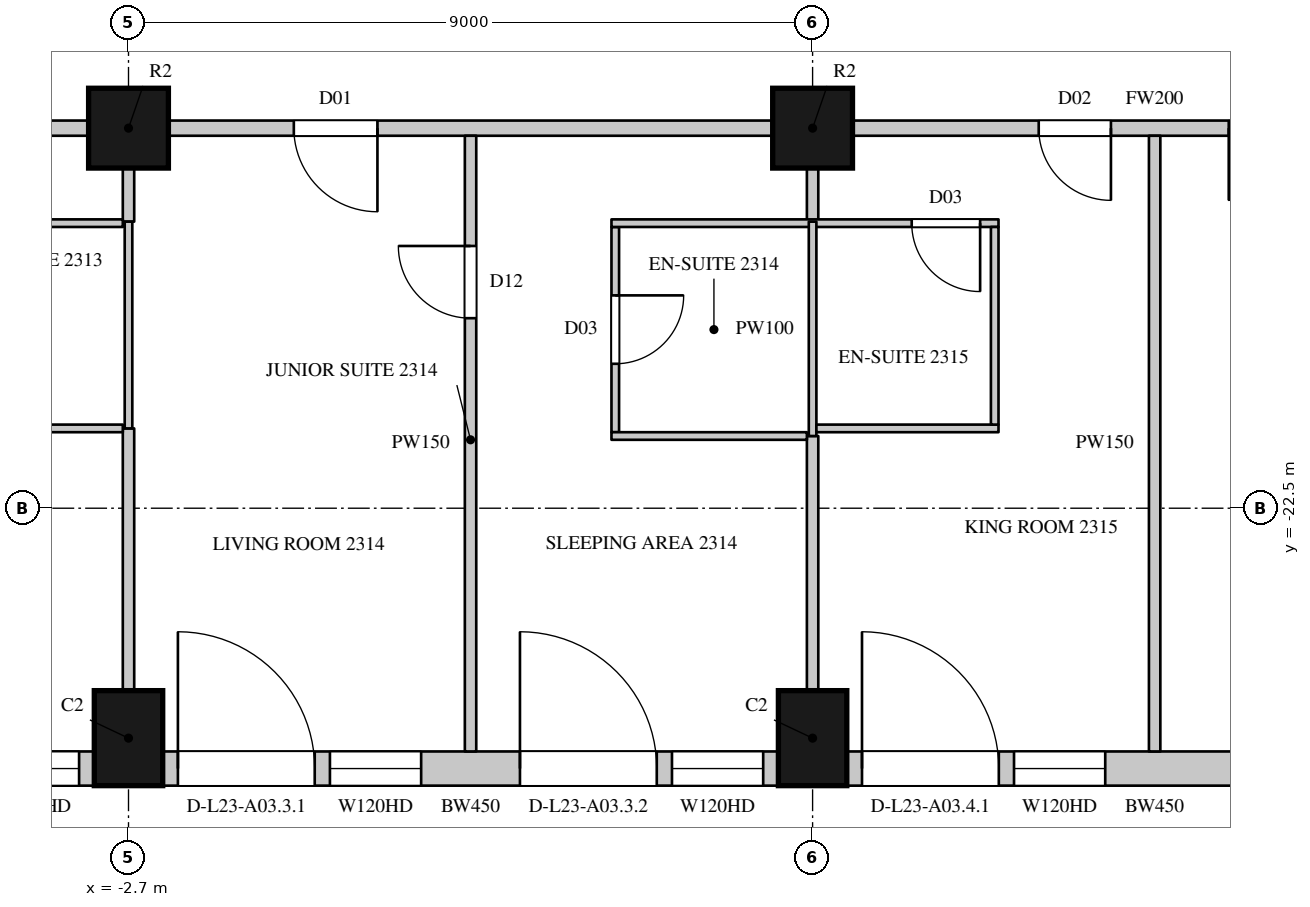
"""IFC4 building model, lengths in metres.
Left out: names, types, materials, properties, quantities, classifications, styles, units other than length and angle.
Written with IfcOpenShell. Run it as: python <this file> out.ifc"""

import sys

from ifc_helpers import new_model, si_unit, direction, frame, frame_2d, origin, origin_2d, place, context, subcontext, project, spatial, rectangle, circle, extrude, element, fill, save


model = new_model("IFC4")
c1 = context("Model", 3, precision=1e-05, world=origin(), true_north=direction((0.0, 1.0)))
c2 = subcontext(c1, "Body", "Model", "MODEL_VIEW")
j1 = project(units=[si_unit("LENGTHUNIT", "METRE"), si_unit("PLANEANGLEUNIT", "RADIAN")], contexts=[c1])
p1 = place(None, origin())
s1 = spatial("IfcSite", under=j1, at=p1, CompositionType="ELEMENT")
p2 = place(p1, origin())
s2 = spatial("IfcBuilding", under=s1, at=p2, CompositionType="ELEMENT")
p3 = place(p2, frame((0.0, 0.0, 113.1)))
s3 = spatial("IfcBuildingStorey", under=s2, at=p3, CompositionType="ELEMENT", Elevation=113.1)
for number, where, z_axis, x_axis in (
    (1, (-2.7, -25.525, 0.0), (0.0, 0.0, 1.0), (1.0, 0.0, 0.0)),
    (2, (6.3, -25.525, 0.0), (0.0, 0.0, 1.0), (1.0, 0.0, 0.0)),
):
    element("IfcColumn", number, at=place(p3, frame(where, z_axis=z_axis, x_axis=x_axis)), inside=s3, PredefinedType="COLUMN", context=c2, shape_type="SweptSolid", body=[
        extrude(rectangle(XDim=0.9, YDim=1.25, at=origin_2d()), origin(), (0.0, 0.0, 1.0), 3.6),
    ])
for number, where, z_axis, x_axis in (
    (3, (-2.7, -17.5, 0.0), (0.0, 0.0, 1.0), (1.0, 0.0, 0.0)),
    (4, (6.3, -17.5, 0.0), (0.0, 0.0, 1.0), (1.0, 0.0, 0.0)),
):
    element("IfcColumn", number, at=place(p3, frame(where, z_axis=z_axis, x_axis=x_axis)), inside=s3, PredefinedType="COLUMN", context=c2, shape_type="SweptSolid", body=[
        extrude(circle(Radius=0.525, at=origin_2d()), origin(), (0.0, 0.0, 1.0), 3.6),
    ])
p4 = place(p3, frame((-11.25, -25.925, 0.0), z_axis=(0.0, 0.0, 1.0), x_axis=(1.0, 0.0, 0.0)))
e5 = element("IfcWall", 5, at=p4, inside=s3, PredefinedType="SOLIDWALL", context=c2, shape_type="SweptSolid", body=[
    extrude(rectangle(XDim=8.1, YDim=0.45, at=frame_2d((4.05, 0.0))), origin(), (0.0, 0.0, 1.0), 3.3),
])
p5 = place(p4, frame((0.2, 0.0, 0.0)))
e6 = element("IfcOpeningElement", 6, at=p5, cuts=e5, PredefinedType="OPENING", context=c2, shape_type="SweptSolid", body=[
    extrude(rectangle(XDim=1.8, YDim=2.4, at=frame_2d((0.9, 1.2))), frame((0.0, 0.235, 0.0), z_axis=(0.0, -1.0, 0.0), x_axis=(1.0, 0.0, 0.0)), (0.0, 0.0, 1.0), 0.47),
])
p6 = place(p4, frame((2.2, 0.0, 1.05)))
e7 = element("IfcOpeningElement", 7, at=p6, cuts=e5, PredefinedType="OPENING", context=c2, shape_type="SweptSolid", body=[
    extrude(rectangle(XDim=1.2, YDim=2.0, at=frame_2d((0.6, 1.0))), frame((0.0, 0.235, 0.0), z_axis=(0.0, -1.0, 0.0), x_axis=(1.0, 0.0, 0.0)), (0.0, 0.0, 1.0), 0.47),
])
p7 = place(p4, frame((4.7, 0.0, 0.0)))
e8 = element("IfcOpeningElement", 8, at=p7, cuts=e5, PredefinedType="OPENING", context=c2, shape_type="SweptSolid", body=[
    extrude(rectangle(XDim=1.8, YDim=2.4, at=frame_2d((0.9, 1.2))), frame((0.0, 0.235, 0.0), z_axis=(0.0, -1.0, 0.0), x_axis=(1.0, 0.0, 0.0)), (0.0, 0.0, 1.0), 0.47),
])
p8 = place(p4, frame((6.7, 0.0, 1.05)))
e9 = element("IfcOpeningElement", 9, at=p8, cuts=e5, PredefinedType="OPENING", context=c2, shape_type="SweptSolid", body=[
    extrude(rectangle(XDim=1.2, YDim=2.0, at=frame_2d((0.6, 1.0))), frame((0.0, 0.235, 0.0), z_axis=(0.0, -1.0, 0.0), x_axis=(1.0, 0.0, 0.0)), (0.0, 0.0, 1.0), 0.47),
])
p9 = place(p3, frame((-2.25, -25.925, 0.0), z_axis=(0.0, 0.0, 1.0), x_axis=(1.0, 0.0, 0.0)))
e10 = element("IfcWall", 10, at=p9, inside=s3, PredefinedType="SOLIDWALL", context=c2, shape_type="SweptSolid", body=[
    extrude(rectangle(XDim=8.1, YDim=0.45, at=frame_2d((4.05, 0.0))), origin(), (0.0, 0.0, 1.0), 3.3),
])
p10 = place(p9, frame((0.2, 0.0, 0.0)))
e11 = element("IfcOpeningElement", 11, at=p10, cuts=e10, PredefinedType="OPENING", context=c2, shape_type="SweptSolid", body=[
    extrude(rectangle(XDim=1.8, YDim=2.4, at=frame_2d((0.9, 1.2))), frame((0.0, 0.235, 0.0), z_axis=(0.0, -1.0, 0.0), x_axis=(1.0, 0.0, 0.0)), (0.0, 0.0, 1.0), 0.47),
])
p11 = place(p9, frame((2.2, 0.0, 1.05)))
e12 = element("IfcOpeningElement", 12, at=p11, cuts=e10, PredefinedType="OPENING", context=c2, shape_type="SweptSolid", body=[
    extrude(rectangle(XDim=1.2, YDim=2.0, at=frame_2d((0.6, 1.0))), frame((0.0, 0.235, 0.0), z_axis=(0.0, -1.0, 0.0), x_axis=(1.0, 0.0, 0.0)), (0.0, 0.0, 1.0), 0.47),
])
p12 = place(p9, frame((4.7, 0.0, 0.0)))
e13 = element("IfcOpeningElement", 13, at=p12, cuts=e10, PredefinedType="OPENING", context=c2, shape_type="SweptSolid", body=[
    extrude(rectangle(XDim=1.8, YDim=2.4, at=frame_2d((0.9, 1.2))), frame((0.0, 0.235, 0.0), z_axis=(0.0, -1.0, 0.0), x_axis=(1.0, 0.0, 0.0)), (0.0, 0.0, 1.0), 0.47),
])
p13 = place(p9, frame((6.7, 0.0, 1.05)))
e14 = element("IfcOpeningElement", 14, at=p13, cuts=e10, PredefinedType="OPENING", context=c2, shape_type="SweptSolid", body=[
    extrude(rectangle(XDim=1.2, YDim=2.0, at=frame_2d((0.6, 1.0))), frame((0.0, 0.235, 0.0), z_axis=(0.0, -1.0, 0.0), x_axis=(1.0, 0.0, 0.0)), (0.0, 0.0, 1.0), 0.47),
])
p14 = place(p3, frame((6.75, -25.925, 0.0), z_axis=(0.0, 0.0, 1.0), x_axis=(1.0, 0.0, 0.0)))
e15 = element("IfcWall", 15, at=p14, inside=s3, PredefinedType="SOLIDWALL", context=c2, shape_type="SweptSolid", body=[
    extrude(rectangle(XDim=8.1, YDim=0.45, at=frame_2d((4.05, 0.0))), origin(), (0.0, 0.0, 1.0), 3.3),
])
p15 = place(p14, frame((0.2, 0.0, 0.0)))
e16 = element("IfcOpeningElement", 16, at=p15, cuts=e15, PredefinedType="OPENING", context=c2, shape_type="SweptSolid", body=[
    extrude(rectangle(XDim=1.8, YDim=2.4, at=frame_2d((0.9, 1.2))), frame((0.0, 0.235, 0.0), z_axis=(0.0, -1.0, 0.0), x_axis=(1.0, 0.0, 0.0)), (0.0, 0.0, 1.0), 0.47),
])
p16 = place(p14, frame((2.2, 0.0, 1.05)))
e17 = element("IfcOpeningElement", 17, at=p16, cuts=e15, PredefinedType="OPENING", context=c2, shape_type="SweptSolid", body=[
    extrude(rectangle(XDim=1.2, YDim=2.0, at=frame_2d((0.6, 1.0))), frame((0.0, 0.235, 0.0), z_axis=(0.0, -1.0, 0.0), x_axis=(1.0, 0.0, 0.0)), (0.0, 0.0, 1.0), 0.47),
])
p17 = place(p14, frame((5.4, 0.0, 0.0)))
e18 = element("IfcOpeningElement", 18, at=p17, cuts=e15, PredefinedType="OPENING", context=c2, shape_type="SweptSolid", body=[
    extrude(rectangle(XDim=1.8, YDim=2.4, at=frame_2d((0.9, 1.2))), frame((0.0, 0.235, 0.0), z_axis=(0.0, -1.0, 0.0), x_axis=(1.0, 0.0, 0.0)), (0.0, 0.0, 1.0), 0.47),
])
p18 = place(p3, frame((-11.175, -17.5, 0.0), z_axis=(0.0, 0.0, 1.0), x_axis=(1.0, 0.0, 0.0)))
e19 = element("IfcWall", 19, at=p18, inside=s3, PredefinedType="PARTITIONING", context=c2, shape_type="SweptSolid", body=[
    extrude(rectangle(XDim=7.95, YDim=0.2, at=frame_2d((3.975, 0.0))), origin(), (0.0, 0.0, 1.0), 2.75),
])
p19 = place(p18, frame((4.55, 0.0, 0.0)))
e20 = element("IfcOpeningElement", 20, at=p19, cuts=e19, PredefinedType="OPENING", context=c2, shape_type="SweptSolid", body=[
    extrude(rectangle(XDim=0.95, YDim=2.2, at=frame_2d((0.475, 1.1))), frame((0.0, 0.11, 0.0), z_axis=(0.0, -1.0, 0.0), x_axis=(1.0, 0.0, 0.0)), (0.0, 0.0, 1.0), 0.22),
])
p20 = place(p3, frame((-2.175, -17.5, 0.0), z_axis=(0.0, 0.0, 1.0), x_axis=(1.0, 0.0, 0.0)))
e21 = element("IfcWall", 21, at=p20, inside=s3, PredefinedType="PARTITIONING", context=c2, shape_type="SweptSolid", body=[
    extrude(rectangle(XDim=7.95, YDim=0.2, at=frame_2d((3.975, 0.0))), origin(), (0.0, 0.0, 1.0), 2.75),
])
p21 = place(p20, frame((1.65, 0.0, 0.0)))
e22 = element("IfcOpeningElement", 22, at=p21, cuts=e21, PredefinedType="OPENING", context=c2, shape_type="SweptSolid", body=[
    extrude(rectangle(XDim=1.1, YDim=2.4, at=frame_2d((0.55, 1.2))), frame((0.0, 0.11, 0.0), z_axis=(0.0, -1.0, 0.0), x_axis=(1.0, 0.0, 0.0)), (0.0, 0.0, 1.0), 0.22),
])
p22 = place(p3, frame((6.825, -17.5, 0.0), z_axis=(0.0, 0.0, 1.0), x_axis=(1.0, 0.0, 0.0)))
e23 = element("IfcWall", 23, at=p22, inside=s3, PredefinedType="PARTITIONING", context=c2, shape_type="SweptSolid", body=[
    extrude(rectangle(XDim=7.95, YDim=0.2, at=frame_2d((3.975, 0.0))), origin(), (0.0, 0.0, 1.0), 2.75),
])
p23 = place(p22, frame((2.45, 0.0, 0.0)))
e24 = element("IfcOpeningElement", 24, at=p23, cuts=e23, PredefinedType="OPENING", context=c2, shape_type="SweptSolid", body=[
    extrude(rectangle(XDim=0.95, YDim=2.2, at=frame_2d((0.475, 1.1))), frame((0.0, 0.11, 0.0), z_axis=(0.0, -1.0, 0.0), x_axis=(1.0, 0.0, 0.0)), (0.0, 0.0, 1.0), 0.22),
])
p24 = place(p22, frame((4.95, 0.0, 0.0)))
e25 = element("IfcOpeningElement", 25, at=p24, cuts=e23, PredefinedType="OPENING", context=c2, shape_type="SweptSolid", body=[
    extrude(rectangle(XDim=0.95, YDim=2.2, at=frame_2d((0.475, 1.1))), frame((0.0, 0.11, 0.0), z_axis=(0.0, -1.0, 0.0), x_axis=(1.0, 0.0, 0.0)), (0.0, 0.0, 1.0), 0.22),
])
p25 = place(p3, frame((-2.7, -24.9, 0.0), z_axis=(0.0, 0.0, 1.0), x_axis=(0.0, 1.0, 0.0)))
e26 = element("IfcWall", 26, at=p25, inside=s3, PredefinedType="PARTITIONING", context=c2, shape_type="SweptSolid", body=[
    extrude(rectangle(XDim=3.45, YDim=0.15, at=frame_2d((1.725, 0.0))), origin(), (0.0, 0.0, 1.0), 2.75),
])
p26 = place(p3, frame((-2.7, -18.73, 0.0), z_axis=(0.0, 0.0, 1.0), x_axis=(0.0, 1.0, 0.0)))
e27 = element("IfcWall", 27, at=p26, inside=s3, PredefinedType="PARTITIONING", context=c2, shape_type="SweptSolid", body=[
    extrude(rectangle(XDim=0.705, YDim=0.15, at=frame_2d((0.353, 0.0))), origin(), (0.0, 0.0, 1.0), 2.75),
])
p27 = place(p3, frame((1.8, -25.7, 0.0), z_axis=(0.0, 0.0, 1.0), x_axis=(0.0, 1.0, 0.0)))
e28 = element("IfcWall", 28, at=p27, inside=s3, PredefinedType="PARTITIONING", context=c2, shape_type="SweptSolid", body=[
    extrude(rectangle(XDim=8.1, YDim=0.15, at=frame_2d((4.05, 0.0))), origin(), (0.0, 0.0, 1.0), 2.65),
])
p28 = place(p27, frame((5.7, 0.0, 0.0)))
e29 = element("IfcOpeningElement", 29, at=p28, cuts=e28, PredefinedType="OPENING", context=c2, shape_type="SweptSolid", body=[
    extrude(rectangle(XDim=0.95, YDim=2.2, at=frame_2d((0.475, 1.1))), frame((0.0, 0.085, 0.0), z_axis=(0.0, -1.0, 0.0), x_axis=(1.0, 0.0, 0.0)), (0.0, 0.0, 1.0), 0.17),
])
p29 = place(p3, frame((6.3, -24.9, 0.0), z_axis=(0.0, 0.0, 1.0), x_axis=(0.0, 1.0, 0.0)))
e30 = element("IfcWall", 30, at=p29, inside=s3, PredefinedType="PARTITIONING", context=c2, shape_type="SweptSolid", body=[
    extrude(rectangle(XDim=3.35, YDim=0.15, at=frame_2d((1.675, 0.0))), origin(), (0.0, 0.0, 1.0), 2.75),
])
p30 = place(p3, frame((6.3, -18.73, 0.0), z_axis=(0.0, 0.0, 1.0), x_axis=(0.0, 1.0, 0.0)))
e31 = element("IfcWall", 31, at=p30, inside=s3, PredefinedType="PARTITIONING", context=c2, shape_type="SweptSolid", body=[
    extrude(rectangle(XDim=0.705, YDim=0.15, at=frame_2d((0.353, 0.0))), origin(), (0.0, 0.0, 1.0), 2.75),
])
p31 = place(p3, frame((10.8, -25.7, 0.0), z_axis=(0.0, 0.0, 1.0), x_axis=(0.0, 1.0, 0.0)))
e32 = element("IfcWall", 32, at=p31, inside=s3, PredefinedType="PARTITIONING", context=c2, shape_type="SweptSolid", body=[
    extrude(rectangle(XDim=8.1, YDim=0.15, at=frame_2d((4.05, 0.0))), origin(), (0.0, 0.0, 1.0), 2.65),
])
for number, where, z_axis, x_axis in (
    (33, (-5.146, -21.45, 0.0), (0.0, 0.0, 1.0), (1.0, 0.0, 0.0)),
    (34, (-5.146, -18.75, 0.0), (0.0, 0.0, 1.0), (1.0, 0.0, 0.0)),
):
    element("IfcWall", number, at=place(p3, frame(where, z_axis=z_axis, x_axis=x_axis)), inside=s3, PredefinedType="PARTITIONING", context=c2, shape_type="SweptSolid", body=[
        extrude(rectangle(XDim=2.371, YDim=0.1, at=frame_2d((1.186, 0.0))), origin(), (0.0, 0.0, 1.0), 3.3),
    ])
p32 = place(p3, frame((-2.7, -21.45, 0.0), z_axis=(0.0, 0.0, 1.0), x_axis=(0.0, 1.0, 0.0)))
e35 = element("IfcWall", 35, at=p32, inside=s3, PredefinedType="PARTITIONING", context=c2, shape_type="SweptSolid", body=[
    extrude(rectangle(XDim=2.72, YDim=0.1, at=frame_2d((1.36, 0.0))), origin(), (0.0, 0.0, 1.0), 2.75),
])
p33 = place(p3, frame((3.704, -21.5, 0.0), z_axis=(0.0, 0.0, 1.0), x_axis=(0.0, 1.0, 0.0)))
e36 = element("IfcWall", 36, at=p33, inside=s3, PredefinedType="PARTITIONING", context=c2, shape_type="SweptSolid", body=[
    extrude(rectangle(XDim=2.7, YDim=0.1, at=frame_2d((1.35, 0.0))), origin(), (0.0, 0.0, 1.0), 3.3),
])
p34 = place(p33, frame((0.9, 0.0, 0.0)))
e37 = element("IfcOpeningElement", 37, at=p34, cuts=e36, PredefinedType="OPENING", context=c2, shape_type="SweptSolid", body=[
    extrude(rectangle(XDim=0.9, YDim=2.2, at=frame_2d((0.45, 1.1))), frame((0.0, 0.06, 0.0), z_axis=(0.0, -1.0, 0.0), x_axis=(1.0, 0.0, 0.0)), (0.0, 0.0, 1.0), 0.12),
])
p35 = place(p3, frame((3.654, -21.55, 0.0), z_axis=(0.0, 0.0, 1.0), x_axis=(1.0, 0.0, 0.0)))
e38 = element("IfcWall", 38, at=p35, inside=s3, PredefinedType="PARTITIONING", context=c2, shape_type="SweptSolid", body=[
    extrude(rectangle(XDim=2.571, YDim=0.1, at=frame_2d((1.286, 0.0))), origin(), (0.0, 0.0, 1.0), 3.3),
])
p36 = place(p3, frame((3.654, -18.75, 0.0), z_axis=(0.0, 0.0, 1.0), x_axis=(1.0, 0.0, 0.0)))
e39 = element("IfcWall", 39, at=p36, inside=s3, PredefinedType="PARTITIONING", context=c2, shape_type="SweptSolid", body=[
    extrude(rectangle(XDim=5.092, YDim=0.1, at=frame_2d((2.546, 0.0))), origin(), (0.0, 0.0, 1.0), 3.3),
])
p37 = place(p36, frame((3.95, 0.0, 0.0)))
e40 = element("IfcOpeningElement", 40, at=p37, cuts=e39, PredefinedType="OPENING", context=c2, shape_type="SweptSolid", body=[
    extrude(rectangle(XDim=0.9, YDim=2.2, at=frame_2d((0.45, 1.1))), frame((0.0, 0.06, 0.0), z_axis=(0.0, -1.0, 0.0), x_axis=(1.0, 0.0, 0.0)), (0.0, 0.0, 1.0), 0.12),
])
p38 = place(p3, frame((6.3, -21.55, 0.0), z_axis=(0.0, 0.0, 1.0), x_axis=(0.0, 1.0, 0.0)))
e41 = element("IfcWall", 41, at=p38, inside=s3, PredefinedType="PARTITIONING", context=c2, shape_type="SweptSolid", body=[
    extrude(rectangle(XDim=2.82, YDim=0.1, at=frame_2d((1.41, 0.0))), origin(), (0.0, 0.0, 1.0), 2.75),
])
p39 = place(p3, frame((6.35, -21.45, 0.0), z_axis=(0.0, 0.0, 1.0), x_axis=(1.0, 0.0, 0.0)))
e42 = element("IfcWall", 42, at=p39, inside=s3, PredefinedType="PARTITIONING", context=c2, shape_type="SweptSolid", body=[
    extrude(rectangle(XDim=2.396, YDim=0.1, at=frame_2d((1.198, 0.0))), origin(), (0.0, 0.0, 1.0), 3.3),
])
p40 = place(p3, frame((8.696, -21.4, 0.0), z_axis=(0.0, 0.0, 1.0), x_axis=(0.0, 1.0, 0.0)))
e43 = element("IfcWall", 43, at=p40, inside=s3, PredefinedType="PARTITIONING", context=c2, shape_type="SweptSolid", body=[
    extrude(rectangle(XDim=2.6, YDim=0.1, at=frame_2d((1.3, 0.0))), origin(), (0.0, 0.0, 1.0), 3.3),
])
p41 = place(p8, origin())
e44 = element("IfcWindow", 44, at=p41, inside=s3, PartitioningType="SINGLE_PANEL", PredefinedType="WINDOW", context=c2, shape_type="SweptSolid", body=[
    extrude(rectangle(XDim=1.2, YDim=2.0, at=frame_2d((0.6, 1.0))), frame((0.0, 0.135, 0.0), z_axis=(0.0, -1.0, 0.0), x_axis=(1.0, 0.0, 0.0)), (0.0, 0.0, 1.0), 0.06),
])
fill(e9, e44)
p42 = place(p10, origin())
e45 = element("IfcDoor", 45, at=p42, inside=s3, OperationType="SLIDING_TO_LEFT", PredefinedType="DOOR", context=c2, shape_type="SweptSolid", body=[
    extrude(rectangle(XDim=1.8, YDim=2.4, at=frame_2d((0.9, 1.2))), frame((0.0, 0.13, 0.0), z_axis=(0.0, -1.0, 0.0), x_axis=(1.0, 0.0, 0.0)), (0.0, 0.0, 1.0), 0.05),
])
fill(e11, e45)
p43 = place(p11, origin())
e46 = element("IfcWindow", 46, at=p43, inside=s3, PartitioningType="SINGLE_PANEL", PredefinedType="WINDOW", context=c2, shape_type="SweptSolid", body=[
    extrude(rectangle(XDim=1.2, YDim=2.0, at=frame_2d((0.6, 1.0))), frame((0.0, 0.135, 0.0), z_axis=(0.0, -1.0, 0.0), x_axis=(1.0, 0.0, 0.0)), (0.0, 0.0, 1.0), 0.06),
])
fill(e12, e46)
p44 = place(p12, origin())
e47 = element("IfcDoor", 47, at=p44, inside=s3, OperationType="SLIDING_TO_LEFT", PredefinedType="DOOR", context=c2, shape_type="SweptSolid", body=[
    extrude(rectangle(XDim=1.8, YDim=2.4, at=frame_2d((0.9, 1.2))), frame((0.0, 0.13, 0.0), z_axis=(0.0, -1.0, 0.0), x_axis=(1.0, 0.0, 0.0)), (0.0, 0.0, 1.0), 0.05),
])
fill(e13, e47)
p45 = place(p13, origin())
e48 = element("IfcWindow", 48, at=p45, inside=s3, PartitioningType="SINGLE_PANEL", PredefinedType="WINDOW", context=c2, shape_type="SweptSolid", body=[
    extrude(rectangle(XDim=1.2, YDim=2.0, at=frame_2d((0.6, 1.0))), frame((0.0, 0.135, 0.0), z_axis=(0.0, -1.0, 0.0), x_axis=(1.0, 0.0, 0.0)), (0.0, 0.0, 1.0), 0.06),
])
fill(e14, e48)
p46 = place(p15, origin())
e49 = element("IfcDoor", 49, at=p46, inside=s3, OperationType="SLIDING_TO_LEFT", PredefinedType="DOOR", context=c2, shape_type="SweptSolid", body=[
    extrude(rectangle(XDim=1.8, YDim=2.4, at=frame_2d((0.9, 1.2))), frame((0.0, 0.13, 0.0), z_axis=(0.0, -1.0, 0.0), x_axis=(1.0, 0.0, 0.0)), (0.0, 0.0, 1.0), 0.05),
])
fill(e16, e49)
p47 = place(p16, origin())
e50 = element("IfcWindow", 50, at=p47, inside=s3, PartitioningType="SINGLE_PANEL", PredefinedType="WINDOW", context=c2, shape_type="SweptSolid", body=[
    extrude(rectangle(XDim=1.2, YDim=2.0, at=frame_2d((0.6, 1.0))), frame((0.0, 0.135, 0.0), z_axis=(0.0, -1.0, 0.0), x_axis=(1.0, 0.0, 0.0)), (0.0, 0.0, 1.0), 0.06),
])
fill(e17, e50)
p48 = place(p21, origin())
e51 = element("IfcDoor", 51, at=p48, inside=s3, OperationType="SINGLE_SWING_LEFT", PredefinedType="DOOR", context=c2, shape_type="SweptSolid", body=[
    extrude(rectangle(XDim=1.1, YDim=2.4, at=frame_2d((0.55, 1.2))), frame((0.0, 0.025, 0.0), z_axis=(0.0, -1.0, 0.0), x_axis=(1.0, 0.0, 0.0)), (0.0, 0.0, 1.0), 0.05),
])
fill(e22, e51)
p49 = place(p28, origin())
e52 = element("IfcDoor", 52, at=p49, inside=s3, OperationType="SINGLE_SWING_RIGHT", PredefinedType="DOOR", context=c2, shape_type="SweptSolid", body=[
    extrude(rectangle(XDim=0.95, YDim=2.2, at=frame_2d((0.475, 1.1))), frame((0.0, 0.025, 0.0), z_axis=(0.0, -1.0, 0.0), x_axis=(1.0, 0.0, 0.0)), (0.0, 0.0, 1.0), 0.05),
])
fill(e29, e52)
p50 = place(p34, origin())
e53 = element("IfcDoor", 53, at=p50, inside=s3, OperationType="SINGLE_SWING_LEFT", PredefinedType="DOOR", context=c2, shape_type="SweptSolid", body=[
    extrude(rectangle(XDim=0.9, YDim=2.2, at=frame_2d((0.45, 1.1))), frame((0.0, 0.025, 0.0), z_axis=(0.0, -1.0, 0.0), x_axis=(1.0, 0.0, 0.0)), (0.0, 0.0, 1.0), 0.05),
])
fill(e37, e53)
p51 = place(p23, origin())
e54 = element("IfcDoor", 54, at=p51, inside=s3, OperationType="SINGLE_SWING_LEFT", PredefinedType="DOOR", context=c2, shape_type="SweptSolid", body=[
    extrude(rectangle(XDim=0.95, YDim=2.2, at=frame_2d((0.475, 1.1))), frame((0.0, 0.025, 0.0), z_axis=(0.0, -1.0, 0.0), x_axis=(1.0, 0.0, 0.0)), (0.0, 0.0, 1.0), 0.05),
])
fill(e24, e54)
p52 = place(p37, origin())
e55 = element("IfcDoor", 55, at=p52, inside=s3, OperationType="SINGLE_SWING_LEFT", PredefinedType="DOOR", context=c2, shape_type="SweptSolid", body=[
    extrude(rectangle(XDim=0.9, YDim=2.2, at=frame_2d((0.45, 1.1))), frame((0.0, 0.025, 0.0), z_axis=(0.0, -1.0, 0.0), x_axis=(1.0, 0.0, 0.0)), (0.0, 0.0, 1.0), 0.05),
])
fill(e40, e55)
p53 = place(p24, origin())
e56 = element("IfcDoor", 56, at=p53, inside=s3, OperationType="SINGLE_SWING_RIGHT", PredefinedType="DOOR", context=c2, shape_type="SweptSolid", body=[
    extrude(rectangle(XDim=0.95, YDim=2.2, at=frame_2d((0.475, 1.1))), frame((0.0, 0.025, 0.0), z_axis=(0.0, -1.0, 0.0), x_axis=(1.0, 0.0, 0.0)), (0.0, 0.0, 1.0), 0.05),
])
fill(e25, e56)
save(model, sys.argv[1])
